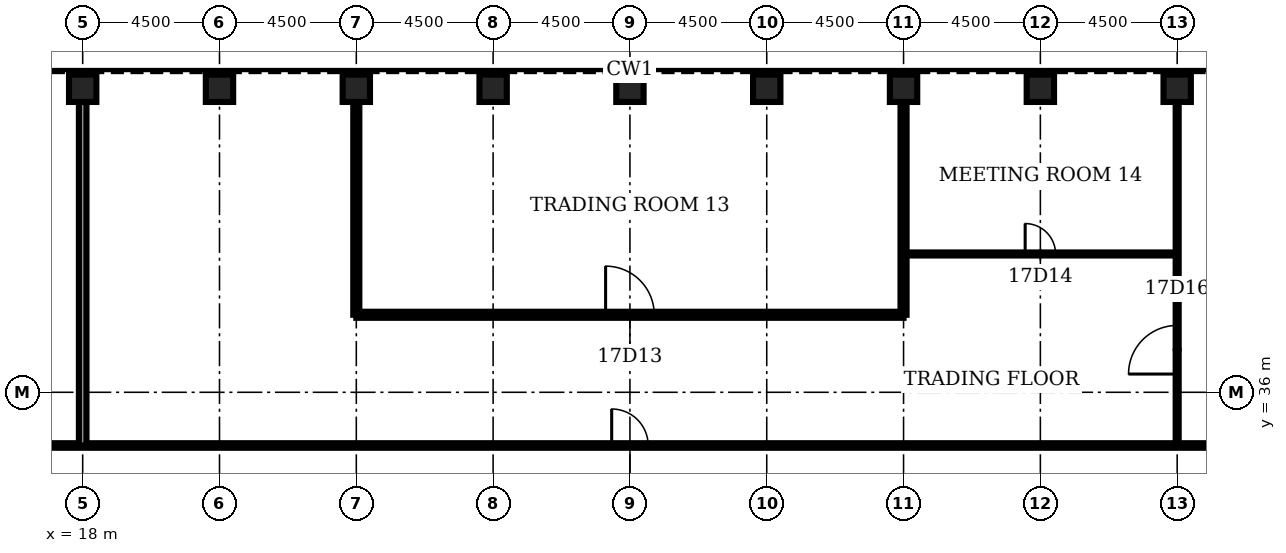
"""IFC4 building model, lengths in metres.
Left out: names, types, materials, properties, quantities, classifications, styles, units other than length and angle.
Written with IfcOpenShell. Run it as: python <this file> out.ifc"""

import sys

from ifc_helpers import new_model, si_unit, direction, frame, frame_2d, origin, origin_2d, place, context, subcontext, project, spatial, rectangle, hollow_rectangle, extrude, element, fill, save


model = new_model("IFC4")
c1 = context("Model", 3, precision=1e-05, world=origin(), true_north=direction((0.0, 1.0)))
c2 = subcontext(c1, "Body", "Model", "MODEL_VIEW")
j1 = project(units=[si_unit("LENGTHUNIT", "METRE"), si_unit("PLANEANGLEUNIT", "RADIAN")], contexts=[c1])
p1 = place(None, origin())
s1 = spatial("IfcSite", under=j1, at=p1, CompositionType="ELEMENT")
p2 = place(p1, origin())
s2 = spatial("IfcBuilding", under=s1, at=p2, CompositionType="ELEMENT")
p3 = place(p2, frame((0.0, 0.0, 81.5)))
s3 = spatial("IfcBuildingStorey", under=s2, at=p3, CompositionType="ELEMENT", Elevation=81.5)
for number, where, z_axis, x_axis in (
    (1, (54.0, 46.0, 0.0), (0.0, 0.0, 1.0), (0.0, 1.0, 0.0)),
    (2, (49.5, 46.0, 0.0), (0.0, 0.0, 1.0), (0.0, 1.0, 0.0)),
    (3, (45.0, 46.0, 0.0), (0.0, 0.0, 1.0), (0.0, 1.0, 0.0)),
    (4, (40.5, 46.0, 0.0), (0.0, 0.0, 1.0), (0.0, 1.0, 0.0)),
    (5, (36.0, 46.0, 0.0), (0.0, 0.0, 1.0), (0.0, 1.0, 0.0)),
    (6, (31.5, 46.0, 0.0), (0.0, 0.0, 1.0), (0.0, 1.0, 0.0)),
    (7, (27.0, 46.0, 0.0), (0.0, 0.0, 1.0), (0.0, 1.0, 0.0)),
    (8, (22.5, 46.0, 0.0), (0.0, 0.0, 1.0), (0.0, 1.0, 0.0)),
    (9, (18.0, 46.0, 0.0), (0.0, 0.0, 1.0), (0.0, 1.0, 0.0)),
):
    element("IfcColumn", number, at=place(p3, frame(where, z_axis=z_axis, x_axis=x_axis)), inside=s3, PredefinedType="COLUMN", context=c2, shape_type="SweptSolid", body=[
        extrude(hollow_rectangle(XDim=0.9, YDim=0.9, WallThickness=0.11, at=origin_2d()), origin(), (0.0, 0.0, 1.0), 4.5),
    ])
p4 = place(p3, frame((15.15, 34.25, 0.0), z_axis=(0.0, 0.0, 1.0), x_axis=(1.0, 0.0, 0.0)))
e10 = element("IfcWall", 10, at=p4, inside=s3, PredefinedType="PARTITIONING", context=c2, shape_type="SweptSolid", body=[
    extrude(rectangle(XDim=41.7, YDim=0.15, at=frame_2d((20.85, 0.0))), origin(), (0.0, 0.0, 1.0), 3.0),
])
p5 = place(p4, frame((20.25, 0.0, 0.0)))
e11 = element("IfcOpeningElement", 11, at=p5, cuts=e10, PredefinedType="OPENING", context=c2, shape_type="SweptSolid", body=[
    extrude(rectangle(XDim=1.2, YDim=2.1, at=frame_2d((0.6, 1.05))), frame((0.0, 0.085, 0.0), z_axis=(0.0, -1.0, 0.0), x_axis=(1.0, 0.0, 0.0)), (0.0, 0.0, 1.0), 0.17),
])
p6 = place(p3, frame((27.0, 38.55, 0.0), z_axis=(0.0, 0.0, 1.0), x_axis=(1.0, 0.0, 0.0)))
e12 = element("IfcWall", 12, at=p6, inside=s3, PredefinedType="PARTITIONING", context=c2, shape_type="SweptSolid", body=[
    extrude(rectangle(XDim=18.0, YDim=0.2, at=frame_2d((9.0, 0.0))), origin(), (0.0, 0.0, 1.0), 3.0),
])
p7 = place(p6, frame((8.2, 0.0, 0.0)))
e13 = element("IfcOpeningElement", 13, at=p7, cuts=e12, PredefinedType="OPENING", context=c2, shape_type="SweptSolid", body=[
    extrude(rectangle(XDim=1.6, YDim=2.1, at=frame_2d((0.8, 1.05))), frame((0.0, 0.11, 0.0), z_axis=(0.0, -1.0, 0.0), x_axis=(1.0, 0.0, 0.0)), (0.0, 0.0, 1.0), 0.22),
])
p8 = place(p3, frame((45.0, 40.55, 0.0), z_axis=(0.0, 0.0, 1.0), x_axis=(1.0, 0.0, 0.0)))
e14 = element("IfcWall", 14, at=p8, inside=s3, PredefinedType="PARTITIONING", context=c2, shape_type="SweptSolid", body=[
    extrude(rectangle(XDim=9.0, YDim=0.1, at=frame_2d((4.5, 0.0))), origin(), (0.0, 0.0, 1.0), 3.0),
])
p9 = place(p8, frame((4.0, 0.0, 0.0)))
e15 = element("IfcOpeningElement", 15, at=p9, cuts=e14, PredefinedType="OPENING", context=c2, shape_type="SweptSolid", body=[
    extrude(rectangle(XDim=1.0, YDim=2.1, at=frame_2d((0.5, 1.05))), frame((0.0, 0.06, 0.0), z_axis=(0.0, -1.0, 0.0), x_axis=(1.0, 0.0, 0.0)), (0.0, 0.0, 1.0), 0.12),
])
p10 = place(p3, frame((18.0, 34.25, 0.0), z_axis=(0.0, 0.0, 1.0), x_axis=(0.0, 1.0, 0.0)))
e16 = element("IfcWall", 16, at=p10, inside=s3, PredefinedType="PARTITIONING", context=c2, shape_type="SweptSolid", body=[
    extrude(rectangle(XDim=11.3, YDim=0.25, at=frame_2d((5.65, 0.0))), origin(), (0.0, 0.0, 1.0), 3.0),
])
for number, where, z_axis, x_axis in (
    (17, (27.0, 38.55, 0.0), (0.0, 0.0, 1.0), (0.0, 1.0, 0.0)),
    (18, (45.0, 38.55, 0.0), (0.0, 0.0, 1.0), (0.0, 1.0, 0.0)),
):
    element("IfcWall", number, at=place(p3, frame(where, z_axis=z_axis, x_axis=x_axis)), inside=s3, PredefinedType="PARTITIONING", context=c2, shape_type="SweptSolid", body=[
        extrude(rectangle(XDim=7.0, YDim=0.2, at=frame_2d((3.5, 0.0))), origin(), (0.0, 0.0, 1.0), 3.0),
    ])
p11 = place(p3, frame((54.0, 34.25, 0.0), z_axis=(0.0, 0.0, 1.0), x_axis=(0.0, 1.0, 0.0)))
e19 = element("IfcWall", 19, at=p11, inside=s3, PredefinedType="PARTITIONING", context=c2, shape_type="SweptSolid", body=[
    extrude(rectangle(XDim=11.3, YDim=0.1, at=frame_2d((5.65, 0.0))), origin(), (0.0, 0.0, 1.0), 3.0),
])
p12 = place(p11, frame((2.35, 0.0, 0.0)))
e20 = element("IfcOpeningElement", 20, at=p12, cuts=e19, PredefinedType="OPENING", context=c2, shape_type="SweptSolid", body=[
    extrude(rectangle(XDim=1.6, YDim=2.1, at=frame_2d((0.8, 1.05))), frame((0.0, 0.06, 0.0), z_axis=(0.0, -1.0, 0.0), x_axis=(1.0, 0.0, 0.0)), (0.0, 0.0, 1.0), 0.12),
])
p13 = place(p7, origin())
e21 = element("IfcDoor", 21, at=p13, inside=s3, OperationType="SINGLE_SWING_LEFT", PredefinedType="DOOR", context=c2, shape_type="SweptSolid", body=[
    extrude(rectangle(XDim=1.6, YDim=2.1, at=frame_2d((0.8, 1.05))), frame((0.0, 0.025, 0.0), z_axis=(0.0, -1.0, 0.0), x_axis=(1.0, 0.0, 0.0)), (0.0, 0.0, 1.0), 0.05),
])
fill(e13, e21)
p14 = place(p9, origin())
e22 = element("IfcDoor", 22, at=p14, inside=s3, OperationType="SINGLE_SWING_LEFT", PredefinedType="DOOR", context=c2, shape_type="SweptSolid", body=[
    extrude(rectangle(XDim=1.0, YDim=2.1, at=frame_2d((0.5, 1.05))), frame((0.0, 0.025, 0.0), z_axis=(0.0, -1.0, 0.0), x_axis=(1.0, 0.0, 0.0)), (0.0, 0.0, 1.0), 0.05),
])
fill(e15, e22)
p15 = place(p12, origin())
e23 = element("IfcDoor", 23, at=p15, inside=s3, OperationType="SINGLE_SWING_LEFT", PredefinedType="DOOR", context=c2, shape_type="SweptSolid", body=[
    extrude(rectangle(XDim=1.6, YDim=2.1, at=frame_2d((0.8, 1.05))), frame((0.0, 0.025, 0.0), z_axis=(0.0, -1.0, 0.0), x_axis=(1.0, 0.0, 0.0)), (0.0, 0.0, 1.0), 0.05),
])
fill(e20, e23)
p16 = place(p5, origin())
e24 = element("IfcDoor", 24, at=p16, inside=s3, OperationType="SINGLE_SWING_LEFT", PredefinedType="DOOR", context=c2, shape_type="SweptSolid", body=[
    extrude(rectangle(XDim=1.2, YDim=2.1, at=frame_2d((0.6, 1.05))), frame((0.0, 0.025, 0.0), z_axis=(0.0, -1.0, 0.0), x_axis=(1.0, 0.0, 0.0)), (0.0, 0.0, 1.0), 0.05),
])
fill(e11, e24)
save(model, sys.argv[1])
